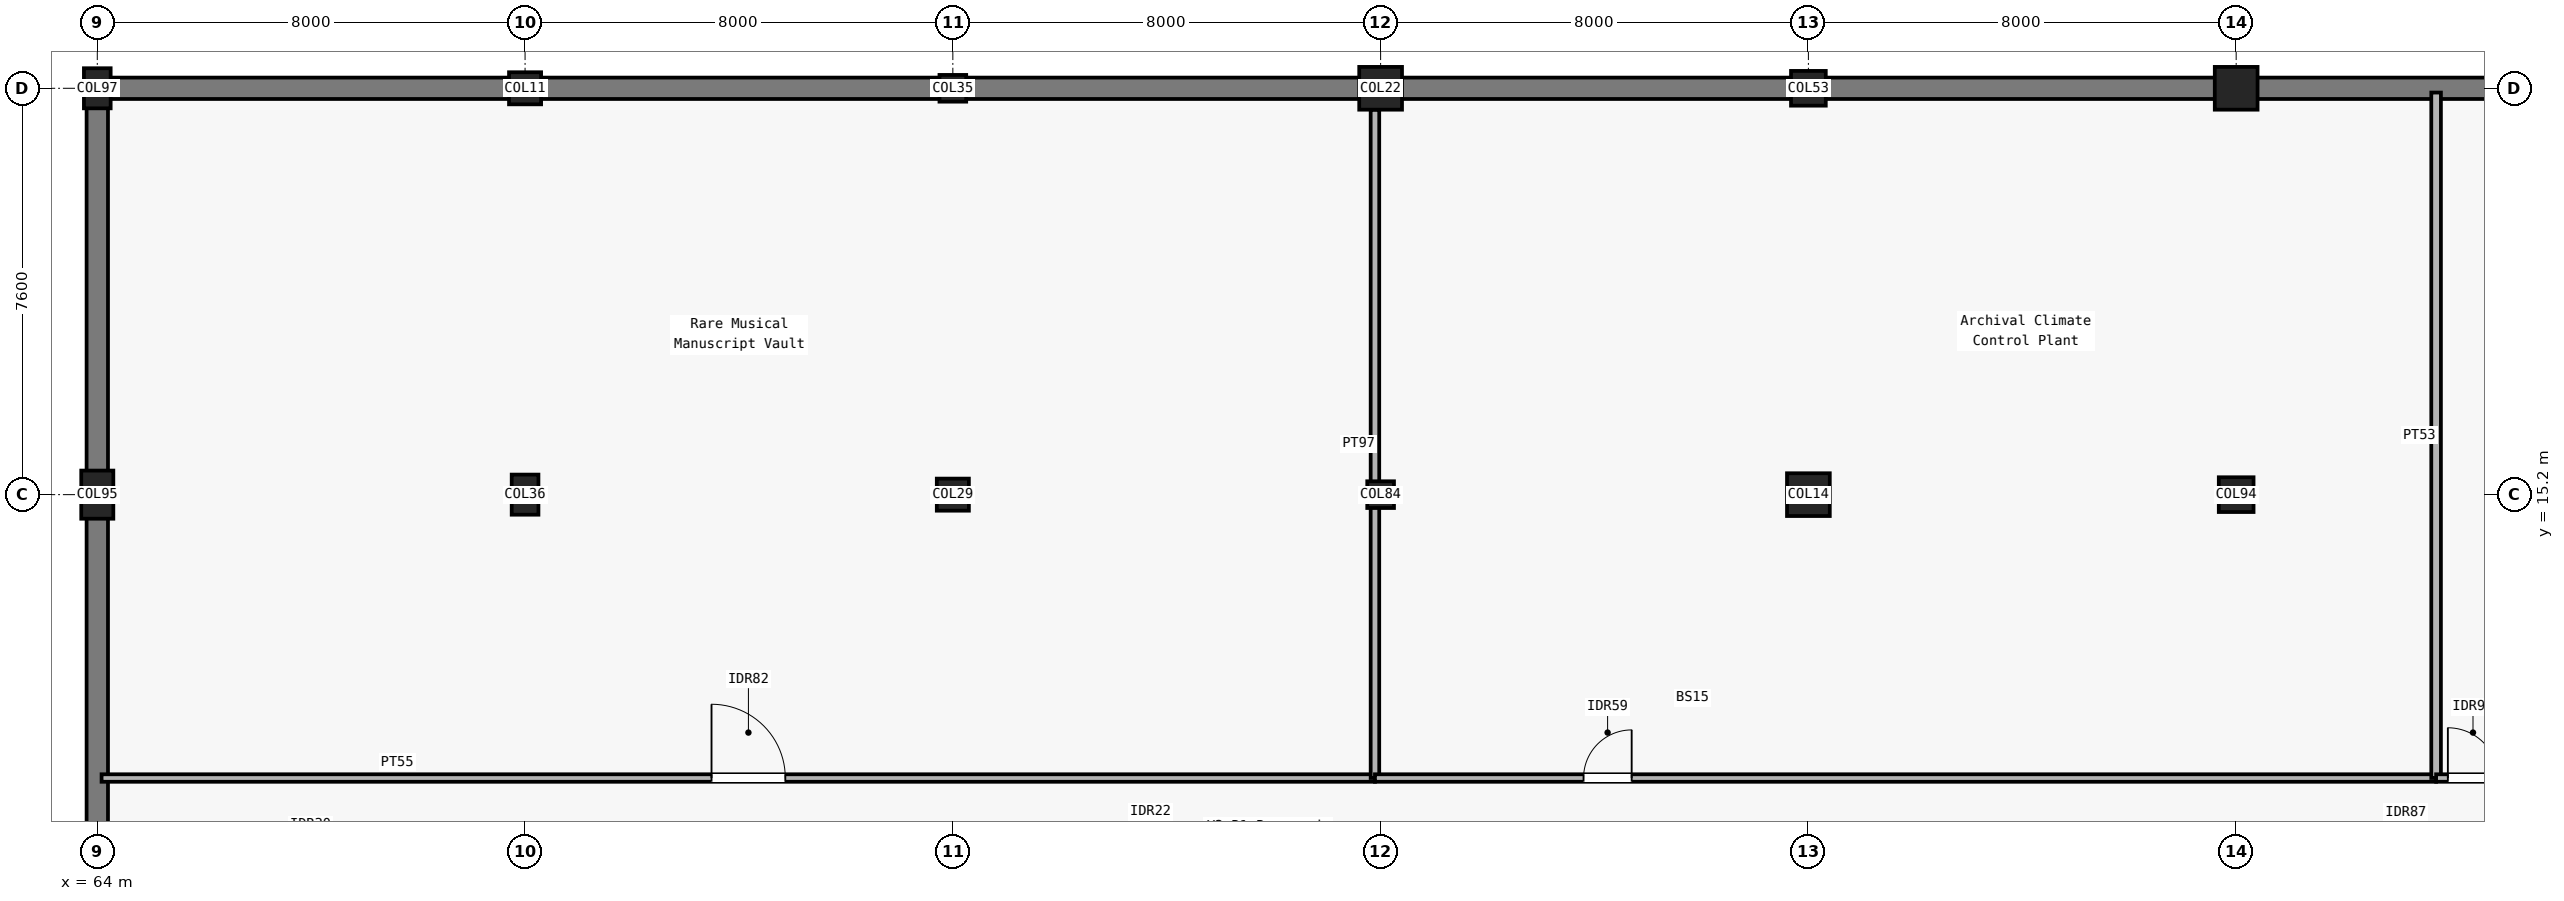
"""IFC4 building model, lengths in metres.
Left out: names, types, materials, properties, quantities, classifications, styles, units other than length and angle.
Written with IfcOpenShell. Run it as: python <this file> out.ifc"""

import sys

from ifc_helpers import new_model, si_unit, direction, frame, frame_2d, origin, origin_2d, place, context, subcontext, project, spatial, rectangle, circle, extrude, element, fill, save


model = new_model("IFC4")
c1 = context("Model", 3, precision=1e-05, world=origin(), true_north=direction((0.0, 1.0)))
c2 = subcontext(c1, "Body", "Model", "MODEL_VIEW")
j1 = project(units=[si_unit("LENGTHUNIT", "METRE"), si_unit("PLANEANGLEUNIT", "RADIAN")], contexts=[c1])
p1 = place(None, origin())
s1 = spatial("IfcSite", under=j1, at=p1, CompositionType="ELEMENT")
p2 = place(p1, origin())
s2 = spatial("IfcBuilding", under=s1, at=p2, CompositionType="ELEMENT")
p3 = place(p2, frame((0.0, 0.0, -5.4)))
s3 = spatial("IfcBuildingStorey", under=s2, at=p3, CompositionType="ELEMENT", Elevation=-5.4)
for number, where, z_axis, x_axis in (
    (1, (72.0, 22.8, 0.0), (0.0, 0.0, 1.0), (-1.0, 0.0, 0.0)),
    (2, (80.0, 22.8, 0.0), (0.0, 0.0, 1.0), (-1.0, 0.0, 0.0)),
    (3, (88.0, 22.8, 0.0), (0.0, 0.0, 1.0), (-1.0, 0.0, 0.0)),
    (4, (96.0, 22.8, 0.0), (0.0, 0.0, 1.0), (-1.0, 0.0, 0.0)),
    (5, (104.0, 22.8, 0.0), (0.0, 0.0, 1.0), (-1.0, 0.0, 0.0)),
    (6, (112.0, 22.8, 0.0), (0.0, 0.0, 1.0), (-1.0, 0.0, 0.0)),
):
    element("IfcWall", number, at=place(p3, frame(where, z_axis=z_axis, x_axis=x_axis)), inside=s3, PredefinedType="USERDEFINED", context=c2, shape_type="SweptSolid", body=[
        extrude(rectangle(XDim=8.0, YDim=0.4, at=frame_2d((4.0, 0.0))), origin(), (0.0, 0.0, 1.0), 5.08),
    ])
p4 = place(p3, frame((64.0, 15.2, 0.0), z_axis=(0.0, 0.0, 1.0), x_axis=(0.0, -1.0, 0.0)))
e7 = element("IfcWall", 7, at=p4, inside=s3, PredefinedType="USERDEFINED", context=c2, shape_type="SweptSolid", body=[
    extrude(rectangle(XDim=7.6, YDim=0.4, at=frame_2d((3.8, 0.0))), origin(), (0.0, 0.0, 1.0), 5.08),
])
p5 = place(p3, frame((64.0, 22.8, 0.0), z_axis=(0.0, 0.0, 1.0), x_axis=(0.0, -1.0, 0.0)))
e8 = element("IfcWall", 8, at=p5, inside=s3, PredefinedType="USERDEFINED", context=c2, shape_type="SweptSolid", body=[
    extrude(rectangle(XDim=7.6, YDim=0.4, at=frame_2d((3.8, 0.0))), origin(), (0.0, 0.0, 1.0), 5.08),
])
p6 = place(p3, frame((64.0, 15.2, 0.0), z_axis=(0.0, 0.0, 1.0), x_axis=(1.0, 0.0, 0.0)))
e9 = element("IfcColumn", 9, at=p6, inside=s3, PredefinedType="COLUMN", context=c2, shape_type="SweptSolid", body=[
    extrude(rectangle(XDim=0.6, YDim=0.9, at=origin_2d()), origin(), (0.0, 0.0, 1.0), 5.4),
])
for number, where, z_axis, x_axis in (
    (10, (64.0, 22.8, 0.0), (0.0, 0.0, 1.0), (1.0, 0.0, 0.0)),
    (11, (72.0, 15.2, 0.0), (0.0, 0.0, 1.0), (1.0, 0.0, 0.0)),
):
    element("IfcColumn", number, at=place(p3, frame(where, z_axis=z_axis, x_axis=x_axis)), inside=s3, PredefinedType="COLUMN", context=c2, shape_type="SweptSolid", body=[
        extrude(rectangle(XDim=0.5, YDim=0.75, at=origin_2d()), origin(), (0.0, 0.0, 1.0), 5.4),
    ])
for number, where, z_axis, x_axis in (
    (12, (72.0, 22.8, 0.0), (0.0, 0.0, 1.0), (1.0, 0.0, 0.0)),
    (13, (80.0, 15.2, 0.0), (0.0, 0.0, 1.0), (1.0, 0.0, 0.0)),
):
    element("IfcColumn", number, at=place(p3, frame(where, z_axis=z_axis, x_axis=x_axis)), inside=s3, PredefinedType="COLUMN", context=c2, shape_type="SweptSolid", body=[
        extrude(rectangle(XDim=0.6, YDim=0.6, at=origin_2d()), origin(), (0.0, 0.0, 1.0), 5.4),
    ])
for number, where, z_axis, x_axis in (
    (14, (80.0, 22.8, 0.0), (0.0, 0.0, 1.0), (1.0, 0.0, 0.0)),
    (15, (88.0, 15.2, 0.0), (0.0, 0.0, 1.0), (1.0, 0.0, 0.0)),
):
    element("IfcColumn", number, at=place(p3, frame(where, z_axis=z_axis, x_axis=x_axis)), inside=s3, PredefinedType="COLUMN", context=c2, shape_type="SweptSolid", body=[
        extrude(rectangle(XDim=0.5, YDim=0.5, at=origin_2d()), origin(), (0.0, 0.0, 1.0), 5.4),
    ])
for number, where, z_axis, x_axis in (
    (16, (88.0, 22.8, 0.0), (0.0, 0.0, 1.0), (1.0, 0.0, 0.0)),
    (17, (96.0, 15.2, 0.0), (0.0, 0.0, 1.0), (1.0, 0.0, 0.0)),
):
    element("IfcColumn", number, at=place(p3, frame(where, z_axis=z_axis, x_axis=x_axis)), inside=s3, PredefinedType="COLUMN", context=c2, shape_type="SweptSolid", body=[
        extrude(circle(Radius=0.4, at=origin_2d()), origin(), (0.0, 0.0, 1.0), 5.4),
    ])
for number, where, z_axis, x_axis in (
    (18, (96.0, 22.8, 0.0), (0.0, 0.0, 1.0), (1.0, 0.0, 0.0)),
    (19, (104.0, 15.2, 0.0), (0.0, 0.0, 1.0), (1.0, 0.0, 0.0)),
):
    element("IfcColumn", number, at=place(p3, frame(where, z_axis=z_axis, x_axis=x_axis)), inside=s3, PredefinedType="COLUMN", context=c2, shape_type="SweptSolid", body=[
        extrude(circle(Radius=0.325, at=origin_2d()), origin(), (0.0, 0.0, 1.0), 5.4),
    ])
p7 = place(p3, frame((104.0, 22.8, 0.0), z_axis=(0.0, 0.0, 1.0), x_axis=(1.0, 0.0, 0.0)))
e20 = element("IfcColumn", 20, at=p7, inside=s3, PredefinedType="COLUMN", context=c2, shape_type="SweptSolid", body=[
    extrude(rectangle(XDim=0.8, YDim=0.8, at=origin_2d()), origin(), (0.0, 0.0, 1.0), 5.4),
])
p8 = place(p3, frame((64.08, 9.9, 0.0), z_axis=(0.0, 0.0, 1.0), x_axis=(1.0, 0.0, 0.0)))
e21 = element("IfcWall", 21, at=p8, inside=s3, PredefinedType="PARTITIONING", context=c2, shape_type="SweptSolid", body=[
    extrude(rectangle(XDim=23.814, YDim=0.14, at=frame_2d((11.907, 0.0))), origin(), (0.0, 0.0, 1.0), 4.305),
])
p9 = place(p8, frame((11.407, 0.0, 0.0)))
e22 = element("IfcOpeningElement", 22, at=p9, cuts=e21, PredefinedType="OPENING", context=c2, shape_type="SweptSolid", body=[
    extrude(rectangle(XDim=1.38, YDim=2.2, at=frame_2d((0.69, 1.1))), frame((0.0, 0.08, 0.0), z_axis=(0.0, -1.0, 0.0), x_axis=(1.0, 0.0, 0.0)), (0.0, 0.0, 1.0), 0.16),
])
p10 = place(p3, frame((87.894, 9.9, 0.0), z_axis=(0.0, 0.0, 1.0), x_axis=(0.0, 1.0, 0.0)))
e23 = element("IfcWall", 23, at=p10, inside=s3, PredefinedType="PARTITIONING", context=c2, shape_type="SweptSolid", body=[
    extrude(rectangle(XDim=12.5, YDim=0.16, at=frame_2d((6.25, 0.0))), origin(), (0.0, 0.0, 1.0), 4.155),
])
p11 = place(p3, frame((87.894, 9.9, 0.0), z_axis=(0.0, 0.0, 1.0), x_axis=(1.0, 0.0, 0.0)))
e24 = element("IfcWall", 24, at=p11, inside=s3, PredefinedType="PARTITIONING", context=c2, shape_type="SweptSolid", body=[
    extrude(rectangle(XDim=19.845, YDim=0.14, at=frame_2d((9.922, 0.0))), origin(), (0.0, 0.0, 1.0), 4.255),
])
p12 = place(p11, frame((3.901, 0.0, 0.0)))
e25 = element("IfcOpeningElement", 25, at=p12, cuts=e24, PredefinedType="OPENING", context=c2, shape_type="SweptSolid", body=[
    extrude(rectangle(XDim=0.9, YDim=2.05, at=frame_2d((0.45, 1.025))), frame((0.0, 0.08, 0.0), z_axis=(0.0, -1.0, 0.0), x_axis=(1.0, 0.0, 0.0)), (0.0, 0.0, 1.0), 0.16),
])
p13 = place(p3, frame((107.739, 9.9, 0.0), z_axis=(0.0, 0.0, 1.0), x_axis=(0.0, 1.0, 0.0)))
e26 = element("IfcWall", 26, at=p13, inside=s3, PredefinedType="PARTITIONING", context=c2, shape_type="SweptSolid", body=[
    extrude(rectangle(XDim=12.82, YDim=0.18, at=frame_2d((6.41, 0.0))), origin(), (0.0, 0.0, 1.0), 4.43),
])
p14 = place(p3, frame((107.739, 9.9, 0.0), z_axis=(0.0, 0.0, 1.0), x_axis=(1.0, 0.0, 0.0)))
e27 = element("IfcWall", 27, at=p14, inside=s3, PredefinedType="PARTITIONING", context=c2, shape_type="SweptSolid", body=[
    extrude(rectangle(XDim=24.31, YDim=0.14, at=frame_2d((12.155, 0.0))), origin(), (0.0, 0.0, 1.0), 4.38),
])
p15 = place(p14, frame((0.22, 0.0, 0.0)))
e28 = element("IfcOpeningElement", 28, at=p15, cuts=e27, PredefinedType="OPENING", context=c2, shape_type="SweptSolid", body=[
    extrude(rectangle(XDim=0.94, YDim=2.05, at=frame_2d((0.47, 1.025))), frame((0.0, 0.08, 0.0), z_axis=(0.0, -1.0, 0.0), x_axis=(1.0, 0.0, 0.0)), (0.0, 0.0, 1.0), 0.16),
])
p16 = place(p9, origin())
e29 = element("IfcDoor", 29, at=p16, inside=s3, OperationType="SINGLE_SWING_LEFT", PredefinedType="DOOR", context=c2, shape_type="SweptSolid", body=[
    extrude(rectangle(XDim=1.38, YDim=2.2, at=frame_2d((0.69, 1.1))), frame((0.0, 0.025, 0.0), z_axis=(0.0, -1.0, 0.0), x_axis=(1.0, 0.0, 0.0)), (0.0, 0.0, 1.0), 0.05),
])
fill(e22, e29)
p17 = place(p12, origin())
e30 = element("IfcDoor", 30, at=p17, inside=s3, OperationType="SINGLE_SWING_RIGHT", PredefinedType="DOOR", context=c2, shape_type="SweptSolid", body=[
    extrude(rectangle(XDim=0.9, YDim=2.05, at=frame_2d((0.45, 1.025))), frame((0.0, 0.025, 0.0), z_axis=(0.0, -1.0, 0.0), x_axis=(1.0, 0.0, 0.0)), (0.0, 0.0, 1.0), 0.05),
])
fill(e25, e30)
p18 = place(p15, origin())
e31 = element("IfcDoor", 31, at=p18, inside=s3, OperationType="SINGLE_SWING_LEFT", PredefinedType="DOOR", context=c2, shape_type="SweptSolid", body=[
    extrude(rectangle(XDim=0.94, YDim=2.05, at=frame_2d((0.47, 1.025))), frame((0.0, 0.025, 0.0), z_axis=(0.0, -1.0, 0.0), x_axis=(1.0, 0.0, 0.0)), (0.0, 0.0, 1.0), 0.05),
])
fill(e28, e31)
save(model, sys.argv[1])
